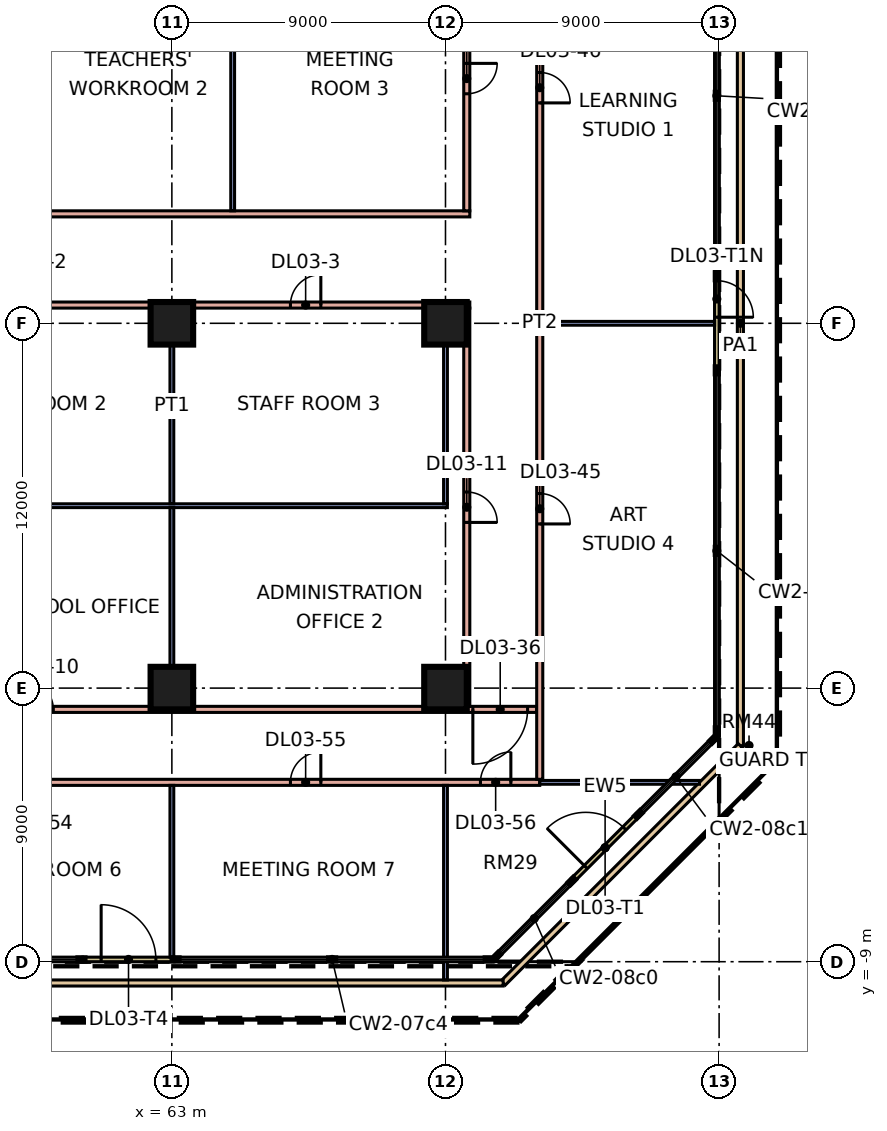
"""IFC4 building model, lengths in metres.
Left out: names, types, materials, properties, quantities, classifications, styles, units other than length and angle.
Written with IfcOpenShell. Run it as: python <this file> out.ifc"""

import sys

from ifc_helpers import new_model, si_unit, direction, frame, frame_2d, origin, origin_2d, place, context, subcontext, project, spatial, rectangle, extrude, element, fill, save


model = new_model("IFC4")
c1 = context("Model", 3, precision=1e-05, world=origin(), true_north=direction((0.0, 1.0)))
c2 = subcontext(c1, "Body", "Model", "MODEL_VIEW")
j1 = project(units=[si_unit("LENGTHUNIT", "METRE"), si_unit("PLANEANGLEUNIT", "RADIAN")], contexts=[c1])
p1 = place(None, origin())
s1 = spatial("IfcSite", under=j1, at=p1, CompositionType="ELEMENT")
p2 = place(p1, origin())
s2 = spatial("IfcBuilding", under=s1, at=p2, CompositionType="ELEMENT")
p3 = place(p2, frame((0.0, 0.0, 16.8)))
s3 = spatial("IfcBuildingStorey", under=s2, at=p3, CompositionType="ELEMENT", Elevation=16.8)
for number, where, z_axis, x_axis in (
    (1, (63.0, 0.0, 0.0), (0.0, 0.0, 1.0), (1.0, 0.0, 0.0)),
    (2, (72.0, 0.0, 0.0), (0.0, 0.0, 1.0), (1.0, 0.0, 0.0)),
    (3, (63.0, 12.0, 0.0), (0.0, 0.0, 1.0), (1.0, 0.0, 0.0)),
    (4, (72.0, 12.0, 0.0), (0.0, 0.0, 1.0), (1.0, 0.0, 0.0)),
):
    element("IfcColumn", number, at=place(p3, frame(where, z_axis=z_axis, x_axis=x_axis)), inside=s3, PredefinedType="COLUMN", context=c2, shape_type="SweptSolid", body=[
        extrude(rectangle(XDim=1.4, YDim=1.4, at=origin_2d()), origin(), (0.0, 0.0, 1.0), 4.8),
    ])
p4 = place(p3, frame((60.074, -8.925, 0.0), z_axis=(0.0, 0.0, 1.0), x_axis=(1.0, 0.0, 0.0)))
e5 = element("IfcWall", 5, at=p4, inside=s3, PredefinedType="SOLIDWALL", context=c2, shape_type="SweptSolid", body=[
    extrude(rectangle(XDim=3.0, YDim=0.15, at=frame_2d((1.5, 0.0))), origin(), (0.0, 0.0, 1.0), 4.4),
])
p5 = place(p4, frame((0.6, 0.0, 0.0)))
e6 = element("IfcOpeningElement", 6, at=p5, cuts=e5, PredefinedType="OPENING", context=c2, shape_type="SweptSolid", body=[
    extrude(rectangle(XDim=1.8, YDim=2.4, at=frame_2d((0.9, 1.2))), frame((0.0, 0.085, 0.0), z_axis=(0.0, -1.0, 0.0), x_axis=(1.0, 0.0, 0.0)), (0.0, 0.0, 1.0), 0.17),
])
p6 = place(p3, frame((76.19, -6.311, 0.0), z_axis=(0.0, 0.0, 1.0), x_axis=(0.707106781187, 0.707106781187, 0.0)))
e7 = element("IfcWall", 7, at=p6, inside=s3, PredefinedType="SOLIDWALL", context=c2, shape_type="SweptSolid", body=[
    extrude(rectangle(XDim=3.0, YDim=0.15, at=frame_2d((1.5, 0.0))), origin(), (0.0, 0.0, 1.0), 4.4),
])
p7 = place(p6, frame((0.6, 0.0, 0.0)))
e8 = element("IfcOpeningElement", 8, at=p7, cuts=e7, PredefinedType="OPENING", context=c2, shape_type="SweptSolid", body=[
    extrude(rectangle(XDim=1.8, YDim=2.4, at=frame_2d((0.9, 1.2))), frame((0.0, 0.085, 0.0), z_axis=(0.0, -1.0, 0.0), x_axis=(1.0, 0.0, 0.0)), (0.0, 0.0, 1.0), 0.17),
])
p8 = place(p3, frame((80.925, 10.5, 0.0), z_axis=(0.0, 0.0, 1.0), x_axis=(0.0, 1.0, 0.0)))
e9 = element("IfcWall", 9, at=p8, inside=s3, PredefinedType="SOLIDWALL", context=c2, shape_type="SweptSolid", body=[
    extrude(rectangle(XDim=3.0, YDim=0.15, at=frame_2d((1.5, 0.0))), origin(), (0.0, 0.0, 1.0), 4.4),
])
p9 = place(p8, frame((1.7, 0.0, 0.0)))
e10 = element("IfcOpeningElement", 10, at=p9, cuts=e9, PredefinedType="OPENING", context=c2, shape_type="SweptSolid", body=[
    extrude(rectangle(XDim=1.2, YDim=2.4, at=frame_2d((0.6, 1.2))), frame((0.0, 0.085, 0.0), z_axis=(0.0, -1.0, 0.0), x_axis=(1.0, 0.0, 0.0)), (0.0, 0.0, 1.0), 0.17),
])
p10 = place(p3, frame((81.7, 25.896, 0.0), z_axis=(0.0, 0.0, 1.0), x_axis=(0.0, -1.0, 0.0)))
e11 = element("IfcWall", 11, at=p10, inside=s3, PredefinedType="PARAPET", context=c2, shape_type="SweptSolid", body=[
    extrude(rectangle(XDim=27.793, YDim=0.2, at=frame_2d((13.896, 0.0))), origin(), (0.0, 0.0, 1.0), 0.5),
])
p11 = place(p3, frame((81.7, -1.896, 0.0), z_axis=(0.0, 0.0, 1.0), x_axis=(-0.707106781187, -0.707106781187, 0.0)))
e12 = element("IfcWall", 12, at=p11, inside=s3, PredefinedType="PARAPET", context=c2, shape_type="SweptSolid", body=[
    extrude(rectangle(XDim=11.036, YDim=0.2, at=frame_2d((5.518, 0.0))), origin(), (0.0, 0.0, 1.0), 0.5),
])
p12 = place(p3, frame((73.896, -9.7, 0.0), z_axis=(0.0, 0.0, 1.0), x_axis=(-1.0, 0.0, 0.0)))
e13 = element("IfcWall", 13, at=p12, inside=s3, PredefinedType="PARAPET", context=c2, shape_type="SweptSolid", body=[
    extrude(rectangle(XDim=64.793, YDim=0.2, at=frame_2d((32.396, 0.0))), origin(), (0.0, 0.0, 1.0), 0.5),
])
p13 = place(p3, frame((2.645, -3.1, 0.0), z_axis=(0.0, 0.0, 1.0), x_axis=(1.0, 0.0, 0.0)))
e14 = element("IfcWall", 14, at=p13, inside=s3, PredefinedType="PARTITIONING", context=c2, shape_type="SweptSolid", body=[
    extrude(rectangle(XDim=72.455, YDim=0.2, at=frame_2d((36.228, 0.0))), origin(), (0.0, 0.0, 1.0), 4.4),
])
p14 = place(p13, frame((4.604, 0.0, 0.0)))
e15 = element("IfcOpeningElement", 15, at=p14, cuts=e14, PredefinedType="OPENING", context=c2, shape_type="SweptSolid", body=[
    extrude(rectangle(XDim=1.0, YDim=2.1, at=frame_2d((0.5, 1.05))), frame((0.0, 0.11, 0.0), z_axis=(0.0, -1.0, 0.0), x_axis=(1.0, 0.0, 0.0)), (0.0, 0.0, 1.0), 0.22),
])
p15 = place(p13, frame((14.755, 0.0, 0.0)))
e16 = element("IfcOpeningElement", 16, at=p15, cuts=e14, PredefinedType="OPENING", context=c2, shape_type="SweptSolid", body=[
    extrude(rectangle(XDim=1.0, YDim=2.1, at=frame_2d((0.5, 1.05))), frame((0.0, 0.11, 0.0), z_axis=(0.0, -1.0, 0.0), x_axis=(1.0, 0.0, 0.0)), (0.0, 0.0, 1.0), 0.22),
])
p16 = place(p13, frame((26.755, 0.0, 0.0)))
e17 = element("IfcOpeningElement", 17, at=p16, cuts=e14, PredefinedType="OPENING", context=c2, shape_type="SweptSolid", body=[
    extrude(rectangle(XDim=1.0, YDim=2.1, at=frame_2d((0.5, 1.05))), frame((0.0, 0.11, 0.0), z_axis=(0.0, -1.0, 0.0), x_axis=(1.0, 0.0, 0.0)), (0.0, 0.0, 1.0), 0.22),
])
p17 = place(p13, frame((37.255, 0.0, 0.0)))
e18 = element("IfcOpeningElement", 18, at=p17, cuts=e14, PredefinedType="OPENING", context=c2, shape_type="SweptSolid", body=[
    extrude(rectangle(XDim=1.0, YDim=2.1, at=frame_2d((0.5, 1.05))), frame((0.0, 0.11, 0.0), z_axis=(0.0, -1.0, 0.0), x_axis=(1.0, 0.0, 0.0)), (0.0, 0.0, 1.0), 0.22),
])
p18 = place(p13, frame((46.255, 0.0, 0.0)))
e19 = element("IfcOpeningElement", 19, at=p18, cuts=e14, PredefinedType="OPENING", context=c2, shape_type="SweptSolid", body=[
    extrude(rectangle(XDim=1.0, YDim=2.1, at=frame_2d((0.5, 1.05))), frame((0.0, 0.11, 0.0), z_axis=(0.0, -1.0, 0.0), x_axis=(1.0, 0.0, 0.0)), (0.0, 0.0, 1.0), 0.22),
])
p19 = place(p13, frame((55.255, 0.0, 0.0)))
e20 = element("IfcOpeningElement", 20, at=p19, cuts=e14, PredefinedType="OPENING", context=c2, shape_type="SweptSolid", body=[
    extrude(rectangle(XDim=1.0, YDim=2.1, at=frame_2d((0.5, 1.05))), frame((0.0, 0.11, 0.0), z_axis=(0.0, -1.0, 0.0), x_axis=(1.0, 0.0, 0.0)), (0.0, 0.0, 1.0), 0.22),
])
p20 = place(p13, frame((64.255, 0.0, 0.0)))
e21 = element("IfcOpeningElement", 21, at=p20, cuts=e14, PredefinedType="OPENING", context=c2, shape_type="SweptSolid", body=[
    extrude(rectangle(XDim=1.0, YDim=2.1, at=frame_2d((0.5, 1.05))), frame((0.0, 0.11, 0.0), z_axis=(0.0, -1.0, 0.0), x_axis=(1.0, 0.0, 0.0)), (0.0, 0.0, 1.0), 0.22),
])
p21 = place(p13, frame((70.505, 0.0, 0.0)))
e22 = element("IfcOpeningElement", 22, at=p21, cuts=e14, PredefinedType="OPENING", context=c2, shape_type="SweptSolid", body=[
    extrude(rectangle(XDim=1.0, YDim=2.1, at=frame_2d((0.5, 1.05))), frame((0.0, 0.11, 0.0), z_axis=(0.0, -1.0, 0.0), x_axis=(1.0, 0.0, 0.0)), (0.0, 0.0, 1.0), 0.22),
])
p22 = place(p3, frame((51.225, 15.6, 0.0), z_axis=(0.0, 0.0, 1.0), x_axis=(1.0, 0.0, 0.0)))
e23 = element("IfcWall", 23, at=p22, inside=s3, PredefinedType="PARTITIONING", context=c2, shape_type="SweptSolid", body=[
    extrude(rectangle(XDim=21.575, YDim=0.2, at=frame_2d((10.788, 0.0))), origin(), (0.0, 0.0, 1.0), 4.4),
])
p23 = place(p3, frame((54.0, -0.7, 0.0), z_axis=(0.0, 0.0, 1.0), x_axis=(1.0, 0.0, 0.0)))
e24 = element("IfcWall", 24, at=p23, inside=s3, PredefinedType="PARTITIONING", context=c2, shape_type="SweptSolid", body=[
    extrude(rectangle(XDim=21.0, YDim=0.2, at=frame_2d((10.5, 0.0))), origin(), (0.0, 0.0, 1.0), 4.4),
])
p24 = place(p23, frame((4.1, 0.0, 0.0)))
e25 = element("IfcOpeningElement", 25, at=p24, cuts=e24, PredefinedType="OPENING", context=c2, shape_type="SweptSolid", body=[
    extrude(rectangle(XDim=1.0, YDim=2.1, at=frame_2d((0.5, 1.05))), frame((0.0, 0.11, 0.0), z_axis=(0.0, -1.0, 0.0), x_axis=(1.0, 0.0, 0.0)), (0.0, 0.0, 1.0), 0.22),
])
p25 = place(p23, frame((18.9, 0.0, 0.0)))
e26 = element("IfcOpeningElement", 26, at=p25, cuts=e24, PredefinedType="OPENING", context=c2, shape_type="SweptSolid", body=[
    extrude(rectangle(XDim=1.8, YDim=2.1, at=frame_2d((0.9, 1.05))), frame((0.0, 0.11, 0.0), z_axis=(0.0, -1.0, 0.0), x_axis=(1.0, 0.0, 0.0)), (0.0, 0.0, 1.0), 0.22),
])
p26 = place(p3, frame((54.0, 12.6, 0.0), z_axis=(0.0, 0.0, 1.0), x_axis=(1.0, 0.0, 0.0)))
e27 = element("IfcWall", 27, at=p26, inside=s3, PredefinedType="PARTITIONING", context=c2, shape_type="SweptSolid", body=[
    extrude(rectangle(XDim=18.8, YDim=0.2, at=frame_2d((9.4, 0.0))), origin(), (0.0, 0.0, 1.0), 4.4),
])
p27 = place(p26, frame((3.9, 0.0, 0.0)))
e28 = element("IfcOpeningElement", 28, at=p27, cuts=e27, PredefinedType="OPENING", context=c2, shape_type="SweptSolid", body=[
    extrude(rectangle(XDim=1.0, YDim=2.1, at=frame_2d((0.5, 1.05))), frame((0.0, 0.11, 0.0), z_axis=(0.0, -1.0, 0.0), x_axis=(1.0, 0.0, 0.0)), (0.0, 0.0, 1.0), 0.22),
])
p28 = place(p26, frame((12.9, 0.0, 0.0)))
e29 = element("IfcOpeningElement", 29, at=p28, cuts=e27, PredefinedType="OPENING", context=c2, shape_type="SweptSolid", body=[
    extrude(rectangle(XDim=1.0, YDim=2.1, at=frame_2d((0.5, 1.05))), frame((0.0, 0.11, 0.0), z_axis=(0.0, -1.0, 0.0), x_axis=(1.0, 0.0, 0.0)), (0.0, 0.0, 1.0), 0.22),
])
p29 = place(p3, frame((54.1, 6.0, 0.0), z_axis=(0.0, 0.0, 1.0), x_axis=(1.0, 0.0, 0.0)))
e30 = element("IfcWall", 30, at=p29, inside=s3, PredefinedType="PARTITIONING", context=c2, shape_type="SweptSolid", body=[
    extrude(rectangle(XDim=17.962, YDim=0.125, at=frame_2d((8.981, 0.0))), origin(), (0.0, 0.0, 1.0), 4.4),
])
p30 = place(p3, frame((63.0, -8.851, 0.0), z_axis=(0.0, 0.0, 1.0), x_axis=(0.0, 1.0, 0.0)))
e31 = element("IfcWall", 31, at=p30, inside=s3, PredefinedType="PARTITIONING", context=c2, shape_type="SweptSolid", body=[
    extrude(rectangle(XDim=5.651, YDim=0.125, at=frame_2d((2.826, 0.0))), origin(), (0.0, 0.0, 1.0), 4.4),
])
p31 = place(p3, frame((63.0, -0.6, 0.0), z_axis=(0.0, 0.0, 1.0), x_axis=(0.0, 1.0, 0.0)))
e32 = element("IfcWall", 32, at=p31, inside=s3, PredefinedType="PARTITIONING", context=c2, shape_type="SweptSolid", body=[
    extrude(rectangle(XDim=6.538, YDim=0.125, at=frame_2d((3.269, 0.0))), origin(), (0.0, 0.0, 1.0), 4.4),
])
p32 = place(p3, frame((63.0, 6.062, 0.0), z_axis=(0.0, 0.0, 1.0), x_axis=(0.0, 1.0, 0.0)))
e33 = element("IfcWall", 33, at=p32, inside=s3, PredefinedType="PARTITIONING", context=c2, shape_type="SweptSolid", body=[
    extrude(rectangle(XDim=6.438, YDim=0.125, at=frame_2d((3.219, 0.0))), origin(), (0.0, 0.0, 1.0), 4.4),
])
p33 = place(p3, frame((65.0, 15.7, 0.0), z_axis=(0.0, 0.0, 1.0), x_axis=(0.0, 1.0, 0.0)))
e34 = element("IfcWall", 34, at=p33, inside=s3, PredefinedType="PARTITIONING", context=c2, shape_type="SweptSolid", body=[
    extrude(rectangle(XDim=8.9, YDim=0.125, at=frame_2d((4.45, 0.0))), origin(), (0.0, 0.0, 1.0), 4.4),
])
p34 = place(p3, frame((72.0, -9.6, 0.0), z_axis=(0.0, 0.0, 1.0), x_axis=(0.0, 1.0, 0.0)))
e35 = element("IfcWall", 35, at=p34, inside=s3, PredefinedType="PARTITIONING", context=c2, shape_type="SweptSolid", body=[
    extrude(rectangle(XDim=6.4, YDim=0.125, at=frame_2d((3.2, 0.0))), origin(), (0.0, 0.0, 1.0), 4.4),
])
p35 = place(p3, frame((72.0, 6.062, 0.0), z_axis=(0.0, 0.0, 1.0), x_axis=(0.0, 1.0, 0.0)))
e36 = element("IfcWall", 36, at=p35, inside=s3, PredefinedType="PARTITIONING", context=c2, shape_type="SweptSolid", body=[
    extrude(rectangle(XDim=6.438, YDim=0.125, at=frame_2d((3.219, 0.0))), origin(), (0.0, 0.0, 1.0), 4.4),
])
p36 = place(p3, frame((72.7, -0.6, 0.0), z_axis=(0.0, 0.0, 1.0), x_axis=(0.0, 1.0, 0.0)))
e37 = element("IfcWall", 37, at=p36, inside=s3, PredefinedType="PARTITIONING", context=c2, shape_type="SweptSolid", body=[
    extrude(rectangle(XDim=13.1, YDim=0.2, at=frame_2d((6.55, 0.0))), origin(), (0.0, 0.0, 1.0), 4.4),
])
p37 = place(p36, frame((6.05, 0.0, 0.0)))
e38 = element("IfcOpeningElement", 38, at=p37, cuts=e37, PredefinedType="OPENING", context=c2, shape_type="SweptSolid", body=[
    extrude(rectangle(XDim=1.0, YDim=2.1, at=frame_2d((0.5, 1.05))), frame((0.0, 0.11, 0.0), z_axis=(0.0, -1.0, 0.0), x_axis=(1.0, 0.0, 0.0)), (0.0, 0.0, 1.0), 0.22),
])
p38 = place(p3, frame((72.7, 15.7, 0.0), z_axis=(0.0, 0.0, 1.0), x_axis=(0.0, 1.0, 0.0)))
e39 = element("IfcWall", 39, at=p38, inside=s3, PredefinedType="PARTITIONING", context=c2, shape_type="SweptSolid", body=[
    extrude(rectangle(XDim=8.9, YDim=0.2, at=frame_2d((4.45, 0.0))), origin(), (0.0, 0.0, 1.0), 4.4),
])
p39 = place(p38, frame((3.85, 0.0, 0.0)))
e40 = element("IfcOpeningElement", 40, at=p39, cuts=e39, PredefinedType="OPENING", context=c2, shape_type="SweptSolid", body=[
    extrude(rectangle(XDim=1.0, YDim=2.1, at=frame_2d((0.5, 1.05))), frame((0.0, 0.11, 0.0), z_axis=(0.0, -1.0, 0.0), x_axis=(1.0, 0.0, 0.0)), (0.0, 0.0, 1.0), 0.22),
])
p40 = place(p3, frame((75.1, -3.1, 0.0), z_axis=(0.0, 0.0, 1.0), x_axis=(1.0, 0.0, 0.0)))
e41 = element("IfcWall", 41, at=p40, inside=s3, PredefinedType="PARTITIONING", context=c2, shape_type="SweptSolid", body=[
    extrude(rectangle(XDim=5.255, YDim=0.125, at=frame_2d((2.627, 0.0))), origin(), (0.0, 0.0, 1.0), 4.4),
])
p41 = place(p3, frame((75.1, -3.0, 0.0), z_axis=(0.0, 0.0, 1.0), x_axis=(0.0, 1.0, 0.0)))
e42 = element("IfcWall", 42, at=p41, inside=s3, PredefinedType="PARTITIONING", context=c2, shape_type="SweptSolid", body=[
    extrude(rectangle(XDim=30.0, YDim=0.2, at=frame_2d((15.0, 0.0))), origin(), (0.0, 0.0, 1.0), 4.4),
])
p42 = place(p41, frame((8.4, 0.0, 0.0)))
e43 = element("IfcOpeningElement", 43, at=p42, cuts=e42, PredefinedType="OPENING", context=c2, shape_type="SweptSolid", body=[
    extrude(rectangle(XDim=1.0, YDim=2.1, at=frame_2d((0.5, 1.05))), frame((0.0, 0.11, 0.0), z_axis=(0.0, -1.0, 0.0), x_axis=(1.0, 0.0, 0.0)), (0.0, 0.0, 1.0), 0.22),
])
p43 = place(p41, frame((22.25, 0.0, 0.0)))
e44 = element("IfcOpeningElement", 44, at=p43, cuts=e42, PredefinedType="OPENING", context=c2, shape_type="SweptSolid", body=[
    extrude(rectangle(XDim=1.0, YDim=2.1, at=frame_2d((0.5, 1.05))), frame((0.0, 0.11, 0.0), z_axis=(0.0, -1.0, 0.0), x_axis=(1.0, 0.0, 0.0)), (0.0, 0.0, 1.0), 0.22),
])
p44 = place(p3, frame((75.2, 12.0, 0.0), z_axis=(0.0, 0.0, 1.0), x_axis=(1.0, 0.0, 0.0)))
e45 = element("IfcWall", 45, at=p44, inside=s3, PredefinedType="PARTITIONING", context=c2, shape_type="SweptSolid", body=[
    extrude(rectangle(XDim=5.651, YDim=0.125, at=frame_2d((2.826, 0.0))), origin(), (0.0, 0.0, 1.0), 4.4),
])
p45 = place(p5, origin())
e46 = element("IfcDoor", 46, at=p45, inside=s3, OperationType="DOUBLE_DOOR_SINGLE_SWING", PredefinedType="DOOR", context=c2, shape_type="SweptSolid", body=[
    extrude(rectangle(XDim=1.8, YDim=2.4, at=frame_2d((0.9, 1.2))), frame((0.0, 0.025, 0.0), z_axis=(0.0, -1.0, 0.0), x_axis=(1.0, 0.0, 0.0)), (0.0, 0.0, 1.0), 0.05),
])
fill(e6, e46)
p46 = place(p7, origin())
e47 = element("IfcDoor", 47, at=p46, inside=s3, OperationType="DOUBLE_DOOR_SINGLE_SWING", PredefinedType="DOOR", context=c2, shape_type="SweptSolid", body=[
    extrude(rectangle(XDim=1.8, YDim=2.4, at=frame_2d((0.9, 1.2))), frame((0.0, 0.025, 0.0), z_axis=(0.0, -1.0, 0.0), x_axis=(1.0, 0.0, 0.0)), (0.0, 0.0, 1.0), 0.05),
])
fill(e8, e47)
p47 = place(p9, frame((1.2, 0.0, 0.0), z_axis=(0.0, 0.0, 1.0), x_axis=(-1.0, 0.0, 0.0)))
e48 = element("IfcDoor", 48, at=p47, inside=s3, OperationType="DOUBLE_DOOR_SINGLE_SWING", PredefinedType="DOOR", context=c2, shape_type="SweptSolid", body=[
    extrude(rectangle(XDim=1.2, YDim=2.4, at=frame_2d((0.6, 1.2))), frame((0.0, 0.025, 0.0), z_axis=(0.0, -1.0, 0.0), x_axis=(1.0, 0.0, 0.0)), (0.0, 0.0, 1.0), 0.05),
])
fill(e10, e48)
p48 = place(p28, frame((1.0, 0.0, 0.0), z_axis=(0.0, 0.0, 1.0), x_axis=(-1.0, 0.0, 0.0)))
e49 = element("IfcDoor", 49, at=p48, inside=s3, OperationType="SINGLE_SWING_RIGHT", PredefinedType="DOOR", context=c2, shape_type="SweptSolid", body=[
    extrude(rectangle(XDim=1.0, YDim=2.1, at=frame_2d((0.5, 1.05))), frame((0.0, 0.025, 0.0), z_axis=(0.0, -1.0, 0.0), x_axis=(1.0, 0.0, 0.0)), (0.0, 0.0, 1.0), 0.05),
])
fill(e29, e49)
p49 = place(p39, origin())
e50 = element("IfcDoor", 50, at=p49, inside=s3, OperationType="SINGLE_SWING_RIGHT", PredefinedType="DOOR", context=c2, shape_type="SweptSolid", body=[
    extrude(rectangle(XDim=1.0, YDim=2.1, at=frame_2d((0.5, 1.05))), frame((0.0, 0.025, 0.0), z_axis=(0.0, -1.0, 0.0), x_axis=(1.0, 0.0, 0.0)), (0.0, 0.0, 1.0), 0.05),
])
fill(e40, e50)
p50 = place(p24, origin())
e51 = element("IfcDoor", 51, at=p50, inside=s3, OperationType="SINGLE_SWING_LEFT", PredefinedType="DOOR", context=c2, shape_type="SweptSolid", body=[
    extrude(rectangle(XDim=1.0, YDim=2.1, at=frame_2d((0.5, 1.05))), frame((0.0, 0.025, 0.0), z_axis=(0.0, -1.0, 0.0), x_axis=(1.0, 0.0, 0.0)), (0.0, 0.0, 1.0), 0.05),
])
fill(e25, e51)
p51 = place(p37, frame((1.0, 0.0, 0.0), z_axis=(0.0, 0.0, 1.0), x_axis=(-1.0, 0.0, 0.0)))
e52 = element("IfcDoor", 52, at=p51, inside=s3, OperationType="SINGLE_SWING_LEFT", PredefinedType="DOOR", context=c2, shape_type="SweptSolid", body=[
    extrude(rectangle(XDim=1.0, YDim=2.1, at=frame_2d((0.5, 1.05))), frame((0.0, 0.025, 0.0), z_axis=(0.0, -1.0, 0.0), x_axis=(1.0, 0.0, 0.0)), (0.0, 0.0, 1.0), 0.05),
])
fill(e38, e52)
p52 = place(p25, frame((1.8, 0.0, 0.0), z_axis=(0.0, 0.0, 1.0), x_axis=(-1.0, 0.0, 0.0)))
e53 = element("IfcDoor", 53, at=p52, inside=s3, OperationType="DOUBLE_DOOR_SINGLE_SWING", PredefinedType="DOOR", context=c2, shape_type="SweptSolid", body=[
    extrude(rectangle(XDim=1.8, YDim=2.1, at=frame_2d((0.9, 1.05))), frame((0.0, 0.025, 0.0), z_axis=(0.0, -1.0, 0.0), x_axis=(1.0, 0.0, 0.0)), (0.0, 0.0, 1.0), 0.05),
])
fill(e26, e53)
p53 = place(p42, frame((1.0, 0.0, 0.0), z_axis=(0.0, 0.0, 1.0), x_axis=(-1.0, 0.0, 0.0)))
e54 = element("IfcDoor", 54, at=p53, inside=s3, OperationType="SINGLE_SWING_LEFT", PredefinedType="DOOR", context=c2, shape_type="SweptSolid", body=[
    extrude(rectangle(XDim=1.0, YDim=2.1, at=frame_2d((0.5, 1.05))), frame((0.0, 0.025, 0.0), z_axis=(0.0, -1.0, 0.0), x_axis=(1.0, 0.0, 0.0)), (0.0, 0.0, 1.0), 0.05),
])
fill(e43, e54)
p54 = place(p43, frame((1.0, 0.0, 0.0), z_axis=(0.0, 0.0, 1.0), x_axis=(-1.0, 0.0, 0.0)))
e55 = element("IfcDoor", 55, at=p54, inside=s3, OperationType="SINGLE_SWING_LEFT", PredefinedType="DOOR", context=c2, shape_type="SweptSolid", body=[
    extrude(rectangle(XDim=1.0, YDim=2.1, at=frame_2d((0.5, 1.05))), frame((0.0, 0.025, 0.0), z_axis=(0.0, -1.0, 0.0), x_axis=(1.0, 0.0, 0.0)), (0.0, 0.0, 1.0), 0.05),
])
fill(e44, e55)
p55 = place(p20, frame((1.0, 0.0, 0.0), z_axis=(0.0, 0.0, 1.0), x_axis=(-1.0, 0.0, 0.0)))
e56 = element("IfcDoor", 56, at=p55, inside=s3, OperationType="SINGLE_SWING_RIGHT", PredefinedType="DOOR", context=c2, shape_type="SweptSolid", body=[
    extrude(rectangle(XDim=1.0, YDim=2.1, at=frame_2d((0.5, 1.05))), frame((0.0, 0.025, 0.0), z_axis=(0.0, -1.0, 0.0), x_axis=(1.0, 0.0, 0.0)), (0.0, 0.0, 1.0), 0.05),
])
fill(e21, e56)
p56 = place(p21, frame((1.0, 0.0, 0.0), z_axis=(0.0, 0.0, 1.0), x_axis=(-1.0, 0.0, 0.0)))
e57 = element("IfcDoor", 57, at=p56, inside=s3, OperationType="SINGLE_SWING_RIGHT", PredefinedType="DOOR", context=c2, shape_type="SweptSolid", body=[
    extrude(rectangle(XDim=1.0, YDim=2.1, at=frame_2d((0.5, 1.05))), frame((0.0, 0.025, 0.0), z_axis=(0.0, -1.0, 0.0), x_axis=(1.0, 0.0, 0.0)), (0.0, 0.0, 1.0), 0.05),
])
fill(e22, e57)
save(model, sys.argv[1])
